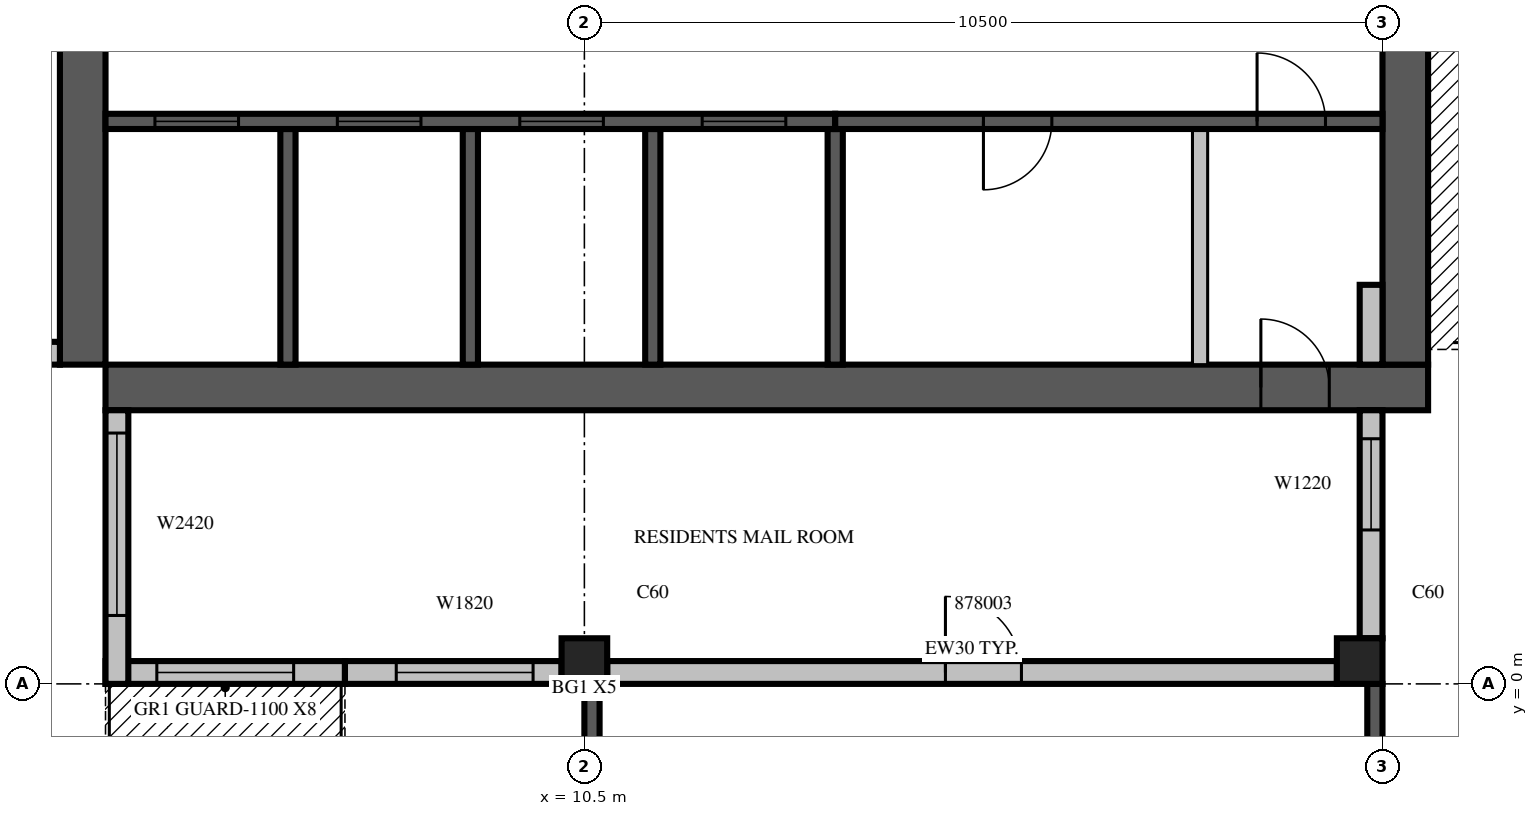
"""IFC4 building model, lengths in metres.
Left out: names, types, materials, properties, quantities, classifications, styles, units other than length and angle.
Written with IfcOpenShell. Run it as: python <this file> out.ifc"""

import sys

from ifc_helpers import new_model, si_unit, direction, frame, frame_2d, origin, origin_2d, place, context, subcontext, project, spatial, rectangle, extrude, source, transform, mapped, element, fill, save


model = new_model("IFC4")
c1 = context("Model", 3, precision=1e-05, world=origin(), true_north=direction((0.0, 1.0)))
c2 = subcontext(c1, "Body", "Model", "MODEL_VIEW")
j1 = project(units=[si_unit("LENGTHUNIT", "METRE"), si_unit("PLANEANGLEUNIT", "RADIAN")], contexts=[c1])
p1 = place(None, origin())
s1 = spatial("IfcSite", under=j1, at=p1, CompositionType="ELEMENT")
p2 = place(p1, origin())
s2 = spatial("IfcBuilding", under=s1, at=p2, CompositionType="ELEMENT")
p3 = place(p2, frame((0.0, 0.0, 333.5)))
s3 = spatial("IfcBuildingStorey", under=s2, at=p3, CompositionType="ELEMENT", Elevation=333.5)
m1 = source(origin(), c2, "Body", "SweptSolid", [
    extrude(rectangle(XDim=0.6, YDim=0.6, at=origin_2d()), origin(), (0.0, 0.0, 1.0), 3.5),
])
for number, where, z_axis, x_axis in (
    (1, (10.5, 0.3, 0.0), (0.0, 0.0, 1.0), (1.0, 0.0, 0.0)),
    (2, (20.7, 0.3, 0.0), (0.0, 0.0, 1.0), (1.0, 0.0, 0.0)),
):
    element("IfcColumn", number, at=place(p3, frame(where, z_axis=z_axis, x_axis=x_axis)), inside=s3, PredefinedType="COLUMN", context=c2, shape_type="MappedRepresentation", body=[
        mapped(m1, transform((0.0, 0.0, 0.0), scale=1.0)),
    ])
m2 = source(origin(), c2, "Body", "SweptSolid", [
    extrude(rectangle(XDim=17.4, YDim=0.6, at=frame_2d((8.7, 0.0))), origin(), (0.0, 0.0, 1.0), 3.5),
])
p4 = place(p3, frame((3.9, 4.2, 0.0), z_axis=(0.0, 0.0, 1.0), x_axis=(0.0, 1.0, 0.0)))
e3 = element("IfcWall", 3, at=p4, inside=s3, PredefinedType="SHEAR", context=c2, shape_type="MappedRepresentation", body=[
    mapped(m2, transform((0.0, 0.0, 0.0), scale=1.0)),
])
m3 = source(origin(), c2, "Body", "SweptSolid", [
    extrude(rectangle(XDim=2.2, YDim=2.1, at=frame_2d((1.1, 1.05))), frame((0.0, 0.31, 0.0), z_axis=(0.0, -1.0, 0.0), x_axis=(1.0, 0.0, 0.0)), (0.0, 0.0, 1.0), 0.62),
])
p5 = place(p4, frame((4.2, 0.0, 0.0)))
e4 = element("IfcOpeningElement", 4, at=p5, cuts=e3, PredefinedType="OPENING", context=c2, shape_type="MappedRepresentation", body=[
    mapped(m3, transform((0.0, 0.0, 0.0), scale=1.0)),
])
p6 = place(p3, frame((4.2, 3.9, 0.0), z_axis=(0.0, 0.0, 1.0), x_axis=(1.0, 0.0, 0.0)))
e5 = element("IfcWall", 5, at=p6, inside=s3, PredefinedType="SHEAR", context=c2, shape_type="MappedRepresentation", body=[
    mapped(m2, transform((0.0, 0.0, 0.0), scale=1.0)),
])
m4 = source(origin(), c2, "Body", "SweptSolid", [
    extrude(rectangle(XDim=0.9, YDim=2.1, at=frame_2d((0.45, 1.05))), frame((0.0, 0.31, 0.0), z_axis=(0.0, -1.0, 0.0), x_axis=(1.0, 0.0, 0.0)), (0.0, 0.0, 1.0), 0.62),
])
p7 = place(p6, frame((15.2, 0.0, 0.0)))
e6 = element("IfcOpeningElement", 6, at=p7, cuts=e5, PredefinedType="OPENING", context=c2, shape_type="MappedRepresentation", body=[
    mapped(m4, transform((0.0, 0.0, 0.0), scale=1.0)),
])
p8 = place(p3, frame((21.3, 4.2, 0.0), z_axis=(0.0, 0.0, 1.0), x_axis=(0.0, 1.0, 0.0)))
e7 = element("IfcWall", 7, at=p8, inside=s3, PredefinedType="SHEAR", context=c2, shape_type="SweptSolid", body=[
    extrude(rectangle(XDim=16.8, YDim=0.6, at=frame_2d((8.4, 0.0))), origin(), (0.0, 0.0, 1.0), 3.5),
])
m5 = source(origin(), c2, "Body", "SweptSolid", [
    extrude(rectangle(XDim=1.2, YDim=2.1, at=frame_2d((0.6, 1.05))), frame((0.0, 0.31, 0.0), z_axis=(0.0, -1.0, 0.0), x_axis=(1.0, 0.0, 0.0)), (0.0, 0.0, 1.0), 0.62),
])
p9 = place(p8, frame((4.2, 0.0, 0.0)))
e8 = element("IfcOpeningElement", 8, at=p9, cuts=e7, PredefinedType="OPENING", context=c2, shape_type="MappedRepresentation", body=[
    mapped(m5, transform((0.0, 0.0, 0.0), scale=1.0)),
])
m6 = source(origin(), c2, "Body", "SweptSolid", [
    extrude(rectangle(XDim=1.2, YDim=2.4, at=frame_2d((0.6, 1.2))), frame((0.0, 0.31, 0.0), z_axis=(0.0, -1.0, 0.0), x_axis=(1.0, 0.0, 0.0)), (0.0, 0.0, 1.0), 0.62),
])
p10 = place(p8, frame((12.0, 0.0, 0.6)))
e9 = element("IfcOpeningElement", 9, at=p10, cuts=e7, PredefinedType="OPENING", context=c2, shape_type="MappedRepresentation", body=[
    mapped(m6, transform((0.0, 0.0, 0.0), scale=1.0)),
])
m7 = source(origin(), c2, "Body", "SweptSolid", [
    extrude(rectangle(XDim=3.15, YDim=0.3, at=frame_2d((1.575, 0.0))), origin(), (0.0, 0.0, 1.0), 3.1),
])
p11 = place(p3, frame((4.2, 0.15, 0.0), z_axis=(0.0, 0.0, 1.0), x_axis=(1.0, 0.0, 0.0)))
e10 = element("IfcWall", 10, at=p11, inside=s3, PredefinedType="STANDARD", context=c2, shape_type="MappedRepresentation", body=[
    mapped(m7, transform((0.0, 0.0, 0.0), scale=1.0)),
])
m8 = source(origin(), c2, "Body", "SweptSolid", [
    extrude(rectangle(XDim=1.8, YDim=2.4, at=frame_2d((0.9, 1.2))), frame((0.0, 0.16, 0.0), z_axis=(0.0, -1.0, 0.0), x_axis=(1.0, 0.0, 0.0)), (0.0, 0.0, 1.0), 0.32),
])
p12 = place(p11, frame((0.675, 0.0, 0.0)))
e11 = element("IfcOpeningElement", 11, at=p12, cuts=e10, PredefinedType="OPENING", context=c2, shape_type="MappedRepresentation", body=[
    mapped(m8, transform((0.0, 0.0, 0.0), scale=1.0)),
])
p13 = place(p3, frame((7.35, 0.15, 0.0), z_axis=(0.0, 0.0, 1.0), x_axis=(1.0, 0.0, 0.0)))
e12 = element("IfcWall", 12, at=p13, inside=s3, PredefinedType="STANDARD", context=c2, shape_type="SweptSolid", body=[
    extrude(rectangle(XDim=2.85, YDim=0.3, at=frame_2d((1.425, 0.0))), origin(), (0.0, 0.0, 1.0), 3.1),
])
m9 = source(origin(), c2, "Body", "SweptSolid", [
    extrude(rectangle(XDim=1.8, YDim=2.0, at=frame_2d((0.9, 1.0))), frame((0.0, 0.16, 0.0), z_axis=(0.0, -1.0, 0.0), x_axis=(1.0, 0.0, 0.0)), (0.0, 0.0, 1.0), 0.32),
])
p14 = place(p13, frame((0.675, 0.0, 0.6)))
e13 = element("IfcOpeningElement", 13, at=p14, cuts=e12, PredefinedType="OPENING", context=c2, shape_type="MappedRepresentation", body=[
    mapped(m9, transform((0.0, 0.0, 0.0), scale=1.0)),
])
m10 = source(origin(), c2, "Body", "SweptSolid", [
    extrude(rectangle(XDim=9.6, YDim=0.3, at=frame_2d((4.8, 0.0))), origin(), (0.0, 0.0, 1.0), 3.1),
])
p15 = place(p3, frame((10.8, 0.15, 0.0), z_axis=(0.0, 0.0, 1.0), x_axis=(1.0, 0.0, 0.0)))
e14 = element("IfcWall", 14, at=p15, inside=s3, PredefinedType="STANDARD", context=c2, shape_type="MappedRepresentation", body=[
    mapped(m10, transform((0.0, 0.0, 0.0), scale=1.0)),
])
m11 = source(origin(), c2, "Body", "SweptSolid", [
    extrude(rectangle(XDim=1.0, YDim=2.1, at=frame_2d((0.5, 1.05))), frame((0.0, 0.16, 0.0), z_axis=(0.0, -1.0, 0.0), x_axis=(1.0, 0.0, 0.0)), (0.0, 0.0, 1.0), 0.32),
])
p16 = place(p15, frame((4.45, 0.0, 0.0)))
e15 = element("IfcOpeningElement", 15, at=p16, cuts=e14, PredefinedType="OPENING", context=c2, shape_type="MappedRepresentation", body=[
    mapped(m11, transform((0.0, 0.0, 0.0), scale=1.0)),
])
m12 = source(origin(), c2, "Body", "SweptSolid", [
    extrude(rectangle(XDim=3.0, YDim=0.3, at=frame_2d((1.5, 0.0))), origin(), (0.0, 0.0, 1.0), 3.1),
])
p17 = place(p3, frame((20.85, 0.6, 0.0), z_axis=(0.0, 0.0, 1.0), x_axis=(0.0, 1.0, 0.0)))
e16 = element("IfcWall", 16, at=p17, inside=s3, PredefinedType="STANDARD", context=c2, shape_type="MappedRepresentation", body=[
    mapped(m12, transform((0.0, 0.0, 0.0), scale=1.0)),
])
m13 = source(origin(), c2, "Body", "SweptSolid", [
    extrude(rectangle(XDim=1.2, YDim=2.0, at=frame_2d((0.6, 1.0))), frame((0.0, 0.16, 0.0), z_axis=(0.0, -1.0, 0.0), x_axis=(1.0, 0.0, 0.0)), (0.0, 0.0, 1.0), 0.32),
])
p18 = place(p17, frame((1.425, 0.0, 0.6)))
e17 = element("IfcOpeningElement", 17, at=p18, cuts=e16, PredefinedType="OPENING", context=c2, shape_type="MappedRepresentation", body=[
    mapped(m13, transform((0.0, 0.0, 0.0), scale=1.0)),
])
m14 = source(origin(), c2, "Body", "SweptSolid", [
    extrude(rectangle(XDim=1.05, YDim=0.3, at=frame_2d((0.525, 0.0))), origin(), (0.0, 0.0, 1.0), 3.1),
])
p19 = place(p3, frame((20.85, 4.2, 0.0), z_axis=(0.0, 0.0, 1.0), x_axis=(0.0, 1.0, 0.0)))
e18 = element("IfcWall", 18, at=p19, inside=s3, PredefinedType="STANDARD", context=c2, shape_type="MappedRepresentation", body=[
    mapped(m14, transform((0.0, 0.0, 0.0), scale=1.0)),
])
m15 = source(origin(), c2, "Body", "SweptSolid", [
    extrude(rectangle(XDim=3.6, YDim=0.3, at=frame_2d((1.8, 0.0))), origin(), (0.0, 0.0, 1.0), 3.1),
])
p20 = place(p3, frame((0.0, 4.35, 0.0), z_axis=(0.0, 0.0, 1.0), x_axis=(1.0, 0.0, 0.0)))
e19 = element("IfcWall", 19, at=p20, inside=s3, PredefinedType="STANDARD", context=c2, shape_type="MappedRepresentation", body=[
    mapped(m15, transform((0.0, 0.0, 0.0), scale=1.0)),
])
m16 = source(origin(), c2, "Body", "SweptSolid", [
    extrude(rectangle(XDim=2.4, YDim=2.0, at=frame_2d((1.2, 1.0))), frame((0.0, 0.16, 0.0), z_axis=(0.0, -1.0, 0.0), x_axis=(1.0, 0.0, 0.0)), (0.0, 0.0, 1.0), 0.32),
])
p21 = place(p20, frame((0.9, 0.0, 0.6)))
e20 = element("IfcOpeningElement", 20, at=p21, cuts=e19, PredefinedType="OPENING", context=c2, shape_type="MappedRepresentation", body=[
    mapped(m16, transform((0.0, 0.0, 0.0), scale=1.0)),
])
p22 = place(p3, frame((4.35, 3.6, 0.0), z_axis=(0.0, 0.0, 1.0), x_axis=(0.0, -1.0, 0.0)))
e21 = element("IfcWall", 21, at=p22, inside=s3, PredefinedType="STANDARD", context=c2, shape_type="MappedRepresentation", body=[
    mapped(m15, transform((0.0, 0.0, 0.0), scale=1.0)),
])
p23 = place(p22, frame((0.3, 0.0, 0.6)))
e22 = element("IfcOpeningElement", 22, at=p23, cuts=e21, PredefinedType="OPENING", context=c2, shape_type="MappedRepresentation", body=[
    mapped(m16, transform((0.0, 0.0, 0.0), scale=1.0)),
])
m17 = source(origin(), c2, "Body", "SweptSolid", [
    extrude(rectangle(XDim=3.9, YDim=0.2, at=frame_2d((1.95, 0.0))), origin(), (0.0, 0.0, 1.0), 3.09),
])
p24 = place(p3, frame((10.6, 0.0, 0.0), z_axis=(0.0, 0.0, 1.0), x_axis=(0.0, -1.0, 0.0)))
e23 = element("IfcWall", 23, at=p24, inside=s3, PredefinedType="SOLIDWALL", context=c2, shape_type="MappedRepresentation", body=[
    mapped(m17, transform((0.0, 0.0, 0.0), scale=1.0)),
])
m18 = source(origin(), c2, "Body", "SweptSolid", [
    extrude(rectangle(XDim=2.4, YDim=2.0, at=frame_2d((1.2, 1.0))), frame((0.0, 0.11, 0.0), z_axis=(0.0, -1.0, 0.0), x_axis=(1.0, 0.0, 0.0)), (0.0, 0.0, 1.0), 0.22),
])
p25 = place(p24, frame((0.75, 0.0, 0.6)))
e24 = element("IfcOpeningElement", 24, at=p25, cuts=e23, PredefinedType="OPENING", context=c2, shape_type="MappedRepresentation", body=[
    mapped(m18, transform((0.0, 0.0, 0.0), scale=1.0)),
])
p26 = place(p3, frame((20.9, 0.0, 0.0), z_axis=(0.0, 0.0, 1.0), x_axis=(0.0, -1.0, 0.0)))
e25 = element("IfcWall", 25, at=p26, inside=s3, PredefinedType="SOLIDWALL", context=c2, shape_type="MappedRepresentation", body=[
    mapped(m17, transform((0.0, 0.0, 0.0), scale=1.0)),
])
p27 = place(p26, frame((0.75, 0.0, 0.6)))
e26 = element("IfcOpeningElement", 26, at=p27, cuts=e25, PredefinedType="OPENING", context=c2, shape_type="MappedRepresentation", body=[
    mapped(m18, transform((0.0, 0.0, 0.0), scale=1.0)),
])
m19 = source(origin(), c2, "Body", "SweptSolid", [
    extrude(rectangle(XDim=3.1, YDim=0.2, at=frame_2d((1.55, 0.0))), origin(), (0.0, 0.0, 1.0), 3.5),
])
for number, where, z_axis, x_axis in (
    (27, (6.6, 4.2, 0.0), (0.0, 0.0, 1.0), (0.0, 1.0, 0.0)),
    (28, (9.0, 4.2, 0.0), (0.0, 0.0, 1.0), (0.0, 1.0, 0.0)),
    (29, (11.4, 4.2, 0.0), (0.0, 0.0, 1.0), (0.0, 1.0, 0.0)),
):
    element("IfcWall", number, at=place(p3, frame(where, z_axis=z_axis, x_axis=x_axis)), inside=s3, PredefinedType="SOLIDWALL", context=c2, shape_type="MappedRepresentation", body=[
        mapped(m19, transform((0.0, 0.0, 0.0), scale=1.0)),
    ])
m20 = source(origin(), c2, "Body", "SweptSolid", [
    extrude(rectangle(XDim=3.1, YDim=0.2, at=frame_2d((1.55, 0.0))), origin(), (0.0, 0.0, 1.0), 3.1),
])
p28 = place(p3, frame((13.8, 4.2, 0.0), z_axis=(0.0, 0.0, 1.0), x_axis=(0.0, 1.0, 0.0)))
e30 = element("IfcWall", 30, at=p28, inside=s3, PredefinedType="SOLIDWALL", context=c2, shape_type="MappedRepresentation", body=[
    mapped(m20, transform((0.0, 0.0, 0.0), scale=1.0)),
])
m21 = source(origin(), c2, "Body", "SweptSolid", [
    extrude(rectangle(XDim=3.1, YDim=0.2, at=frame_2d((1.55, 0.0))), origin(), (0.0, 0.0, 1.0), 3.1),
])
p29 = place(p3, frame((18.6, 4.2, 0.0), z_axis=(0.0, 0.0, 1.0), x_axis=(0.0, 1.0, 0.0)))
e31 = element("IfcWall", 31, at=p29, inside=s3, PredefinedType="PARTITIONING", context=c2, shape_type="MappedRepresentation", body=[
    mapped(m21, transform((0.0, 0.0, 0.0), scale=1.0)),
])
m22 = source(origin(), c2, "Body", "SweptSolid", [
    extrude(rectangle(XDim=9.6, YDim=0.2, at=frame_2d((4.8, 0.0))), origin(), (0.0, 0.0, 1.0), 3.5),
])
p30 = place(p3, frame((4.2, 7.4, 0.0), z_axis=(0.0, 0.0, 1.0), x_axis=(1.0, 0.0, 0.0)))
e32 = element("IfcWall", 32, at=p30, inside=s3, PredefinedType="SOLIDWALL", context=c2, shape_type="MappedRepresentation", body=[
    mapped(m22, transform((0.0, 0.0, 0.0), scale=1.0)),
])
m23 = source(origin(), c2, "Body", "SweptSolid", [
    extrude(rectangle(XDim=1.1, YDim=2.1, at=frame_2d((0.55, 1.05))), frame((0.0, 0.11, 0.0), z_axis=(0.0, -1.0, 0.0), x_axis=(1.0, 0.0, 0.0)), (0.0, 0.0, 1.0), 0.22),
])
p31 = place(p30, frame((0.65, 0.0, 0.0)))
e33 = element("IfcOpeningElement", 33, at=p31, cuts=e32, PredefinedType="OPENING", context=c2, shape_type="MappedRepresentation", body=[
    mapped(m23, transform((0.0, 0.0, 0.0), scale=1.0)),
])
p32 = place(p30, frame((3.05, 0.0, 0.0)))
e34 = element("IfcOpeningElement", 34, at=p32, cuts=e32, PredefinedType="OPENING", context=c2, shape_type="MappedRepresentation", body=[
    mapped(m23, transform((0.0, 0.0, 0.0), scale=1.0)),
])
p33 = place(p30, frame((5.45, 0.0, 0.0)))
e35 = element("IfcOpeningElement", 35, at=p33, cuts=e32, PredefinedType="OPENING", context=c2, shape_type="MappedRepresentation", body=[
    mapped(m23, transform((0.0, 0.0, 0.0), scale=1.0)),
])
p34 = place(p30, frame((7.85, 0.0, 0.0)))
e36 = element("IfcOpeningElement", 36, at=p34, cuts=e32, PredefinedType="OPENING", context=c2, shape_type="MappedRepresentation", body=[
    mapped(m23, transform((0.0, 0.0, 0.0), scale=1.0)),
])
m24 = source(origin(), c2, "Body", "SweptSolid", [
    extrude(rectangle(XDim=7.2, YDim=0.2, at=frame_2d((3.6, 0.0))), origin(), (0.0, 0.0, 1.0), 3.1),
])
p35 = place(p3, frame((13.8, 7.4, 0.0), z_axis=(0.0, 0.0, 1.0), x_axis=(1.0, 0.0, 0.0)))
e37 = element("IfcWall", 37, at=p35, inside=s3, PredefinedType="SOLIDWALL", context=c2, shape_type="MappedRepresentation", body=[
    mapped(m24, transform((0.0, 0.0, 0.0), scale=1.0)),
])
m25 = source(origin(), c2, "Body", "SweptSolid", [
    extrude(rectangle(XDim=0.9, YDim=2.1, at=frame_2d((0.45, 1.05))), frame((0.0, 0.11, 0.0), z_axis=(0.0, -1.0, 0.0), x_axis=(1.0, 0.0, 0.0)), (0.0, 0.0, 1.0), 0.22),
])
p36 = place(p35, frame((1.95, 0.0, 0.0)))
e38 = element("IfcOpeningElement", 38, at=p36, cuts=e37, PredefinedType="OPENING", context=c2, shape_type="MappedRepresentation", body=[
    mapped(m25, transform((0.0, 0.0, 0.0), scale=1.0)),
])
p37 = place(p35, frame((5.55, 0.0, 0.0)))
e39 = element("IfcOpeningElement", 39, at=p37, cuts=e37, PredefinedType="OPENING", context=c2, shape_type="MappedRepresentation", body=[
    mapped(m25, transform((0.0, 0.0, 0.0), scale=1.0)),
])
m26 = source(origin(), c2, "Body", "SweptSolid", [
    extrude(rectangle(XDim=1.8, YDim=2.4, at=frame_2d((0.9, 1.2))), frame((0.0, 0.025, 0.0), z_axis=(0.0, -1.0, 0.0), x_axis=(1.0, 0.0, 0.0)), (0.0, 0.0, 1.0), 0.05),
])
p38 = place(p12, origin())
e40 = element("IfcDoor", 40, at=p38, inside=s3, OperationType="SLIDING_TO_LEFT", PredefinedType="DOOR", context=c2, shape_type="MappedRepresentation", body=[
    mapped(m26, transform((0.0, 0.0, 0.0), scale=1.0)),
])
fill(e11, e40)
m27 = source(origin(), c2, "Body", "SweptSolid", [
    extrude(rectangle(XDim=1.8, YDim=2.0, at=frame_2d((0.9, 1.0))), frame((0.0, 0.03, 0.0), z_axis=(0.0, -1.0, 0.0), x_axis=(1.0, 0.0, 0.0)), (0.0, 0.0, 1.0), 0.06),
])
p39 = place(p14, origin())
e41 = element("IfcWindow", 41, at=p39, inside=s3, PartitioningType="SINGLE_PANEL", PredefinedType="WINDOW", context=c2, shape_type="MappedRepresentation", body=[
    mapped(m27, transform((0.0, 0.0, 0.0), scale=1.0)),
])
fill(e13, e41)
m28 = source(origin(), c2, "Body", "SweptSolid", [
    extrude(rectangle(XDim=1.2, YDim=2.0, at=frame_2d((0.6, 1.0))), frame((0.0, 0.03, 0.0), z_axis=(0.0, -1.0, 0.0), x_axis=(1.0, 0.0, 0.0)), (0.0, 0.0, 1.0), 0.06),
])
p40 = place(p18, origin())
e42 = element("IfcWindow", 42, at=p40, inside=s3, PartitioningType="SINGLE_PANEL", PredefinedType="WINDOW", context=c2, shape_type="MappedRepresentation", body=[
    mapped(m28, transform((0.0, 0.0, 0.0), scale=1.0)),
])
fill(e17, e42)
m29 = source(origin(), c2, "Body", "SweptSolid", [
    extrude(rectangle(XDim=2.4, YDim=2.0, at=frame_2d((1.2, 1.0))), frame((0.0, 0.03, 0.0), z_axis=(0.0, -1.0, 0.0), x_axis=(1.0, 0.0, 0.0)), (0.0, 0.0, 1.0), 0.06),
])
p41 = place(p23, origin())
e43 = element("IfcWindow", 43, at=p41, inside=s3, PartitioningType="SINGLE_PANEL", PredefinedType="WINDOW", context=c2, shape_type="MappedRepresentation", body=[
    mapped(m29, transform((0.0, 0.0, 0.0), scale=1.0)),
])
fill(e22, e43)
m30 = source(origin(), c2, "Body", "SweptSolid", [
    extrude(rectangle(XDim=1.1, YDim=2.1, at=frame_2d((0.55, 1.05))), frame((0.0, 0.025, 0.0), z_axis=(0.0, -1.0, 0.0), x_axis=(1.0, 0.0, 0.0)), (0.0, 0.0, 1.0), 0.05),
])
p42 = place(p31, origin())
e44 = element("IfcDoor", 44, at=p42, inside=s3, OperationType="SLIDING_TO_LEFT", PredefinedType="DOOR", context=c2, shape_type="MappedRepresentation", body=[
    mapped(m30, transform((0.0, 0.0, 0.0), scale=1.0)),
])
fill(e33, e44)
p43 = place(p32, origin())
e45 = element("IfcDoor", 45, at=p43, inside=s3, OperationType="SLIDING_TO_LEFT", PredefinedType="DOOR", context=c2, shape_type="MappedRepresentation", body=[
    mapped(m30, transform((0.0, 0.0, 0.0), scale=1.0)),
])
fill(e34, e45)
p44 = place(p33, origin())
e46 = element("IfcDoor", 46, at=p44, inside=s3, OperationType="SLIDING_TO_LEFT", PredefinedType="DOOR", context=c2, shape_type="MappedRepresentation", body=[
    mapped(m30, transform((0.0, 0.0, 0.0), scale=1.0)),
])
fill(e35, e46)
p45 = place(p34, origin())
e47 = element("IfcDoor", 47, at=p45, inside=s3, OperationType="SLIDING_TO_LEFT", PredefinedType="DOOR", context=c2, shape_type="MappedRepresentation", body=[
    mapped(m30, transform((0.0, 0.0, 0.0), scale=1.0)),
])
fill(e36, e47)
m31 = source(origin(), c2, "Body", "SweptSolid", [
    extrude(rectangle(XDim=0.9, YDim=2.1, at=frame_2d((0.45, 1.05))), frame((0.0, 0.025, 0.0), z_axis=(0.0, -1.0, 0.0), x_axis=(1.0, 0.0, 0.0)), (0.0, 0.0, 1.0), 0.05),
])
p46 = place(p36, origin())
e48 = element("IfcDoor", 48, at=p46, inside=s3, OperationType="SINGLE_SWING_RIGHT", PredefinedType="DOOR", context=c2, shape_type="MappedRepresentation", body=[
    mapped(m31, transform((0.0, 0.0, 0.0), scale=1.0)),
])
fill(e38, e48)
p47 = place(p37, origin())
e49 = element("IfcDoor", 49, at=p47, inside=s3, OperationType="SINGLE_SWING_LEFT", PredefinedType="DOOR", context=c2, shape_type="MappedRepresentation", body=[
    mapped(m31, transform((0.0, 0.0, 0.0), scale=1.0)),
])
fill(e39, e49)
p48 = place(p7, origin())
e50 = element("IfcDoor", 50, at=p48, inside=s3, OperationType="SINGLE_SWING_LEFT", PredefinedType="DOOR", context=c2, shape_type="MappedRepresentation", body=[
    mapped(m31, transform((0.0, 0.0, 0.0), scale=1.0)),
])
fill(e6, e50)
m32 = source(origin(), c2, "Body", "SweptSolid", [
    extrude(rectangle(XDim=1.0, YDim=2.1, at=frame_2d((0.5, 1.05))), frame((0.0, 0.025, 0.0), z_axis=(0.0, -1.0, 0.0), x_axis=(1.0, 0.0, 0.0)), (0.0, 0.0, 1.0), 0.05),
])
p49 = place(p16, origin())
e51 = element("IfcDoor", 51, at=p49, inside=s3, OperationType="SINGLE_SWING_LEFT", PredefinedType="DOOR", context=c2, shape_type="MappedRepresentation", body=[
    mapped(m32, transform((0.0, 0.0, 0.0), scale=1.0)),
])
fill(e15, e51)
save(model, sys.argv[1])
